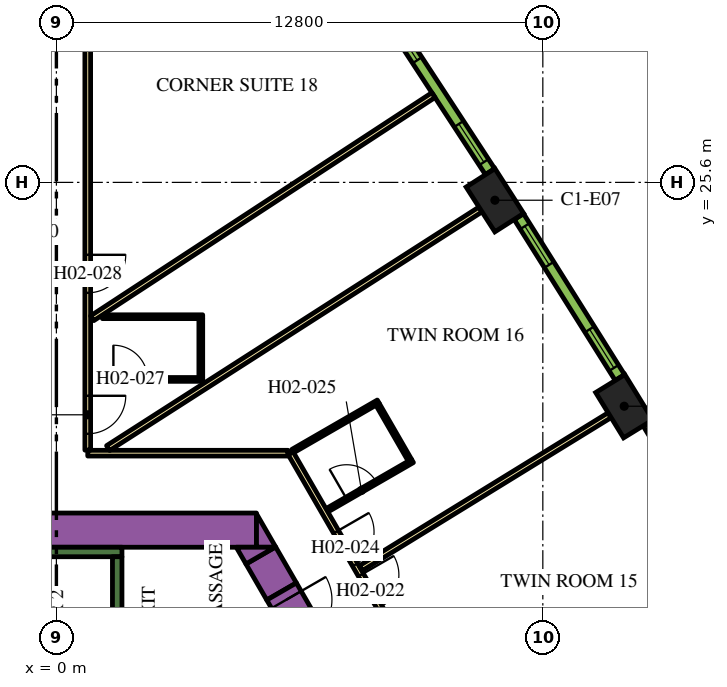
"""IFC4 building model, lengths in metres.
Left out: names, types, materials, properties, quantities, classifications, styles, units other than length and angle.
Written with IfcOpenShell. Run it as: python <this file> out.ifc"""

import sys

from ifc_helpers import new_model, si_unit, direction, frame, frame_2d, origin, origin_2d, place, context, subcontext, project, spatial, polyline, rectangle, outline, extrude, element, fill, save


model = new_model("IFC4")
c1 = context("Model", 3, precision=1e-05, world=origin(), true_north=direction((0.0, 1.0)))
c2 = subcontext(c1, "Body", "Model", "MODEL_VIEW")
j1 = project(units=[si_unit("LENGTHUNIT", "METRE"), si_unit("PLANEANGLEUNIT", "RADIAN")], contexts=[c1])
p1 = place(None, origin())
s1 = spatial("IfcSite", under=j1, at=p1, CompositionType="ELEMENT")
p2 = place(p1, origin())
s2 = spatial("IfcBuilding", under=s1, at=p2, CompositionType="ELEMENT")
p3 = place(p2, frame((0.0, 0.0, 43.2)))
s3 = spatial("IfcBuildingStorey", under=s2, at=p3, CompositionType="ELEMENT", Elevation=43.2)
for number, where, z_axis, x_axis in (
    (1, (14.942, 19.71, 0.0), (0.0, 0.0, 1.0), (-0.524, 0.852, 0.0)),
    (2, (11.539, 25.131, 0.0), (0.0, 0.0, 1.0), (-0.539, 0.842, 0.0)),
):
    element("IfcColumn", number, at=place(p3, frame(where, z_axis=z_axis, x_axis=x_axis)), inside=s3, PredefinedType="COLUMN", context=c2, shape_type="SweptSolid", body=[
        extrude(rectangle(XDim=1.4, YDim=0.9, at=origin_2d()), origin(), (0.0, 0.0, 1.0), 3.9),
    ])
p4 = place(p3, frame((-4.224, 16.45, 0.0), z_axis=(0.0, 0.0, 1.0), x_axis=(1.0, 0.0, 0.0)))
e3 = element("IfcWall", 3, at=p4, inside=s3, PredefinedType="SOLIDWALL", context=c2, shape_type="SweptSolid", body=[
    extrude(rectangle(XDim=9.488, YDim=0.9, at=frame_2d((4.744, 0.0))), origin(), (0.0, 0.0, 1.0), 3.9),
])
p5 = place(p3, origin())
e4 = element("IfcWall", 4, at=p5, inside=s3, PredefinedType="SOLIDWALL", context=c2, shape_type="SweptSolid", body=[
    extrude(outline(polyline([(5.265, 16.0), (5.265, 16.88), (5.773, 16.0), (5.265, 16.0)])), origin(), (0.0, 0.0, 1.0), 3.9),
])
p6 = place(p3, frame((5.926, 14.836, 0.0), z_axis=(0.0, 0.0, 1.0), x_axis=(-0.500076735116, 0.865981096212, 0.0)))
e5 = element("IfcWall", 5, at=p6, inside=s3, PredefinedType="SOLIDWALL", context=c2, shape_type="SweptSolid", body=[
    extrude(rectangle(XDim=1.094, YDim=0.9, at=frame_2d((0.547, 0.0))), origin(), (0.0, 0.0, 1.0), 3.9),
])
e6 = element("IfcWall", 6, at=p5, inside=s3, PredefinedType="SOLIDWALL", context=c2, shape_type="SweptSolid", body=[
    extrude(outline(polyline([(4.734, 16.0), (5.75, 16.0), (4.988, 15.56), (4.734, 16.0)])), origin(), (0.0, 0.0, 1.0), 3.9),
])
p7 = place(p3, frame((-1.725, 15.875, 0.0), z_axis=(0.0, 0.0, 1.0), x_axis=(1.0, 0.0, 0.0)))
e7 = element("IfcWall", 7, at=p7, inside=s3, PredefinedType="SOLIDWALL", context=c2, shape_type="SweptSolid", body=[
    extrude(rectangle(XDim=3.45, YDim=0.25, at=frame_2d((1.725, 0.0))), origin(), (0.0, 0.0, 1.0), 3.9),
])
p8 = place(p3, frame((1.6, 8.95, 0.0), z_axis=(0.0, 0.0, 1.0), x_axis=(0.0, 1.0, 0.0)))
e8 = element("IfcWall", 8, at=p8, inside=s3, PredefinedType="SOLIDWALL", context=c2, shape_type="SweptSolid", body=[
    extrude(rectangle(XDim=6.8, YDim=0.25, at=frame_2d((3.4, 0.0))), origin(), (0.0, 0.0, 1.0), 3.9),
])
p9 = place(p3, frame((5.926, 14.836, 0.0), z_axis=(0.0, 0.0, 1.0), x_axis=(0.500062241894, -0.865989465428, 0.0)))
e9 = element("IfcWall", 9, at=p9, inside=s3, PredefinedType="SOLIDWALL", context=c2, shape_type="SweptSolid", body=[
    extrude(rectangle(XDim=1.7, YDim=0.9, at=frame_2d((0.85, 0.0))), origin(), (0.0, 0.0, 1.0), 3.9),
])
p10 = place(p9, frame((0.25, 0.0, 0.0)))
e10 = element("IfcOpeningElement", 10, at=p10, cuts=e9, PredefinedType="OPENING", context=c2, shape_type="SweptSolid", body=[
    extrude(rectangle(XDim=1.2, YDim=2.1, at=frame_2d((0.6, 1.05))), frame((0.0, 0.46, 0.0), z_axis=(0.0, -1.0, 0.0), x_axis=(1.0, 0.0, 0.0)), (0.0, 0.0, 1.0), 0.92),
])
p11 = place(p3, frame((6.163, 18.475, 0.0), z_axis=(0.0, 0.0, 1.0), x_axis=(0.500001317485, -0.866024643133, 0.0)))
e11 = element("IfcWall", 11, at=p11, inside=s3, PredefinedType="PARTITIONING", context=c2, shape_type="SweptSolid", body=[
    extrude(rectangle(XDim=25.767, YDim=0.15, at=frame_2d((12.883, 0.0))), origin(), (0.0, 0.0, 1.0), 2.75),
])
p12 = place(p11, frame((24.586, 0.0, 0.0)))
e12 = element("IfcOpeningElement", 12, at=p12, cuts=e11, PredefinedType="OPENING", context=c2, shape_type="SweptSolid", body=[
    extrude(rectangle(XDim=1.0, YDim=2.1, at=frame_2d((0.5, 1.05))), frame((0.0, 0.085, 0.0), z_axis=(0.0, -1.0, 0.0), x_axis=(1.0, 0.0, 0.0)), (0.0, 0.0, 1.0), 0.17),
])
p13 = place(p11, frame((16.196, 0.0, 0.0)))
e13 = element("IfcOpeningElement", 13, at=p13, cuts=e11, PredefinedType="OPENING", context=c2, shape_type="SweptSolid", body=[
    extrude(rectangle(XDim=1.0, YDim=2.1, at=frame_2d((0.5, 1.05))), frame((0.0, 0.085, 0.0), z_axis=(0.0, -1.0, 0.0), x_axis=(1.0, 0.0, 0.0)), (0.0, 0.0, 1.0), 0.17),
])
p14 = place(p11, frame((14.789, 0.0, 0.0)))
e14 = element("IfcOpeningElement", 14, at=p14, cuts=e11, PredefinedType="OPENING", context=c2, shape_type="SweptSolid", body=[
    extrude(rectangle(XDim=1.1, YDim=2.1, at=frame_2d((0.55, 1.05))), frame((0.0, 0.085, 0.0), z_axis=(0.0, -1.0, 0.0), x_axis=(1.0, 0.0, 0.0)), (0.0, 0.0, 1.0), 0.17),
])
p15 = place(p11, frame((3.698, 0.0, 0.0)))
e15 = element("IfcOpeningElement", 15, at=p15, cuts=e11, PredefinedType="OPENING", context=c2, shape_type="SweptSolid", body=[
    extrude(rectangle(XDim=1.0, YDim=2.1, at=frame_2d((0.5, 1.05))), frame((0.0, 0.085, 0.0), z_axis=(0.0, -1.0, 0.0), x_axis=(1.0, 0.0, 0.0)), (0.0, 0.0, 1.0), 0.17),
])
p16 = place(p11, frame((2.391, 0.0, 0.0)))
e16 = element("IfcOpeningElement", 16, at=p16, cuts=e11, PredefinedType="OPENING", context=c2, shape_type="SweptSolid", body=[
    extrude(rectangle(XDim=1.0, YDim=2.1, at=frame_2d((0.5, 1.05))), frame((0.0, 0.085, 0.0), z_axis=(0.0, -1.0, 0.0), x_axis=(1.0, 0.0, 0.0)), (0.0, 0.0, 1.0), 0.17),
])
p17 = place(p3, frame((0.825, 18.475, 0.0), z_axis=(0.0, 0.0, 1.0), x_axis=(1.0, 0.0, 0.0)))
e17 = element("IfcWall", 17, at=p17, inside=s3, PredefinedType="PARTITIONING", context=c2, shape_type="SweptSolid", body=[
    extrude(rectangle(XDim=5.268, YDim=0.15, at=frame_2d((2.634, 0.0))), origin(), (0.0, 0.0, 1.0), 2.75),
])
p18 = place(p3, frame((0.825, 34.699, 0.0), z_axis=(0.0, 0.0, 1.0), x_axis=(0.0, -1.0, 0.0)))
e18 = element("IfcWall", 18, at=p18, inside=s3, PredefinedType="PARTITIONING", context=c2, shape_type="SweptSolid", body=[
    extrude(rectangle(XDim=16.144, YDim=0.15, at=frame_2d((8.072, 0.0))), origin(), (0.0, 0.0, 1.0), 2.75),
])
p19 = place(p18, frame((14.714, 0.0, 0.0)))
e19 = element("IfcOpeningElement", 19, at=p19, cuts=e18, PredefinedType="OPENING", context=c2, shape_type="SweptSolid", body=[
    extrude(rectangle(XDim=1.0, YDim=2.1, at=frame_2d((0.5, 1.05))), frame((0.0, 0.085, 0.0), z_axis=(0.0, -1.0, 0.0), x_axis=(1.0, 0.0, 0.0)), (0.0, 0.0, 1.0), 0.17),
])
p20 = place(p18, frame((11.005, 0.0, 0.0)))
e20 = element("IfcOpeningElement", 20, at=p20, cuts=e18, PredefinedType="OPENING", context=c2, shape_type="SweptSolid", body=[
    extrude(rectangle(XDim=1.0, YDim=2.1, at=frame_2d((0.5, 1.05))), frame((0.0, 0.085, 0.0), z_axis=(0.0, -1.0, 0.0), x_axis=(1.0, 0.0, 0.0)), (0.0, 0.0, 1.0), 0.17),
])
p21 = place(p3, frame((9.922, 27.896, 0.0), z_axis=(0.0, 0.0, 1.0), x_axis=(-0.836970816595, -0.547247523675, 0.0)))
e21 = element("IfcWall", 21, at=p21, inside=s3, PredefinedType="PARTITIONING", context=c2, shape_type="SweptSolid", body=[
    extrude(rectangle(XDim=10.729, YDim=0.15, at=frame_2d((5.364, 0.0))), origin(), (0.0, 0.0, 1.0), 2.75),
])
p22 = place(p3, frame((11.16, 24.888, 0.0), z_axis=(0.0, 0.0, 1.0), x_axis=(-0.84199813156, -0.539480441211, 0.0)))
e22 = element("IfcWall", 22, at=p22, inside=s3, PredefinedType="PARTITIONING", context=c2, shape_type="SweptSolid", body=[
    extrude(rectangle(XDim=11.638, YDim=0.15, at=frame_2d((5.819, 0.0))), origin(), (0.0, 0.0, 1.0), 2.75),
])
p23 = place(p3, frame((14.558, 19.475, 0.0), z_axis=(0.0, 0.0, 1.0), x_axis=(-0.851829455142, -0.523819223925, 0.0)))
e23 = element("IfcWall", 23, at=p23, inside=s3, PredefinedType="PARTITIONING", context=c2, shape_type="SweptSolid", body=[
    extrude(rectangle(XDim=7.688, YDim=0.15, at=frame_2d((3.844, 0.0))), origin(), (0.0, 0.0, 1.0), 2.75),
])
p24 = place(p3, frame((7.118, 16.971, 0.0), z_axis=(0.0, 0.0, 1.0), x_axis=(0.866021400173, 0.500006934395, 0.0)))
e24 = element("IfcWall", 24, at=p24, inside=s3, PredefinedType="PARTITIONING", context=c2, shape_type="SweptSolid", body=[
    extrude(rectangle(XDim=2.6, YDim=0.1, at=frame_2d((1.3, 0.0))), origin(), (0.0, 0.0, 1.0), 2.75),
])
p25 = place(p24, frame((0.6, 0.0, 0.0)))
e25 = element("IfcOpeningElement", 25, at=p25, cuts=e24, PredefinedType="OPENING", context=c2, shape_type="SweptSolid", body=[
    extrude(rectangle(XDim=0.9, YDim=2.1, at=frame_2d((0.45, 1.05))), frame((0.0, 0.06, 0.0), z_axis=(0.0, -1.0, 0.0), x_axis=(1.0, 0.0, 0.0)), (0.0, 0.0, 1.0), 0.12),
])
p26 = place(p3, frame((9.302, 18.289, 0.0), z_axis=(0.0, 0.0, 1.0), x_axis=(-0.500062241894, 0.865989465428, 0.0)))
e26 = element("IfcWall", 26, at=p26, inside=s3, PredefinedType="PARTITIONING", context=c2, shape_type="SweptSolid", body=[
    extrude(rectangle(XDim=1.7, YDim=0.1, at=frame_2d((0.85, 0.0))), origin(), (0.0, 0.0, 1.0), 2.75),
])
p27 = place(p3, frame((6.218, 18.53, 0.0), z_axis=(0.0, 0.0, 1.0), x_axis=(0.865997922154, 0.500047596559, 0.0)))
e27 = element("IfcWall", 27, at=p27, inside=s3, PredefinedType="PARTITIONING", context=c2, shape_type="SweptSolid", body=[
    extrude(rectangle(XDim=2.6, YDim=0.1, at=frame_2d((1.3, 0.0))), origin(), (0.0, 0.0, 1.0), 2.75),
])
p28 = place(p3, frame((0.9, 20.416, 0.0), z_axis=(0.0, 0.0, 1.0), x_axis=(1.0, 0.0, 0.0)))
e28 = element("IfcWall", 28, at=p28, inside=s3, PredefinedType="PARTITIONING", context=c2, shape_type="SweptSolid", body=[
    extrude(rectangle(XDim=2.95, YDim=0.1, at=frame_2d((1.475, 0.0))), origin(), (0.0, 0.0, 1.0), 2.75),
])
p29 = place(p28, frame((0.6, 0.0, 0.0)))
e29 = element("IfcOpeningElement", 29, at=p29, cuts=e28, PredefinedType="OPENING", context=c2, shape_type="SweptSolid", body=[
    extrude(rectangle(XDim=0.9, YDim=2.1, at=frame_2d((0.45, 1.05))), frame((0.0, 0.06, 0.0), z_axis=(0.0, -1.0, 0.0), x_axis=(1.0, 0.0, 0.0)), (0.0, 0.0, 1.0), 0.12),
])
p30 = place(p3, frame((3.8, 20.466, 0.0), z_axis=(0.0, 0.0, 1.0), x_axis=(0.0, 1.0, 0.0)))
e30 = element("IfcWall", 30, at=p30, inside=s3, PredefinedType="PARTITIONING", context=c2, shape_type="SweptSolid", body=[
    extrude(rectangle(XDim=1.55, YDim=0.1, at=frame_2d((0.775, 0.0))), origin(), (0.0, 0.0, 1.0), 2.75),
])
p31 = place(p3, frame((1.21, 22.066, 0.0), z_axis=(0.0, 0.0, 1.0), x_axis=(1.0, 0.0, 0.0)))
e31 = element("IfcWall", 31, at=p31, inside=s3, PredefinedType="PARTITIONING", context=c2, shape_type="SweptSolid", body=[
    extrude(rectangle(XDim=2.64, YDim=0.1, at=frame_2d((1.32, 0.0))), origin(), (0.0, 0.0, 1.0), 2.75),
])
p32 = place(p3, frame((18.143, 14.986, 0.0), z_axis=(0.0, 0.0, 1.0), x_axis=(-0.515938796285, 0.856625448191, 0.0)))
e32 = element("IfcWall", 32, at=p32, inside=s3, PredefinedType="SOLIDWALL", context=c2, shape_type="SweptSolid", body=[
    extrude(rectangle(XDim=4.998, YDim=0.29, at=frame_2d((2.499, 0.0))), origin(), (0.0, 0.0, 1.0), 3.65),
])
p33 = place(p32, frame((0.297, 0.0, 0.9)))
e33 = element("IfcOpeningElement", 33, at=p33, cuts=e32, PredefinedType="OPENING", context=c2, shape_type="SweptSolid", body=[
    extrude(rectangle(XDim=1.2, YDim=2.15, at=frame_2d((0.6, 1.075))), frame((0.0, 0.155, 0.0), z_axis=(0.0, -1.0, 0.0), x_axis=(1.0, 0.0, 0.0)), (0.0, 0.0, 1.0), 0.31),
])
p34 = place(p32, frame((3.501, 0.0, 0.9)))
e34 = element("IfcOpeningElement", 34, at=p34, cuts=e32, PredefinedType="OPENING", context=c2, shape_type="SweptSolid", body=[
    extrude(rectangle(XDim=1.2, YDim=2.15, at=frame_2d((0.6, 1.075))), frame((0.0, 0.155, 0.0), z_axis=(0.0, -1.0, 0.0), x_axis=(1.0, 0.0, 0.0)), (0.0, 0.0, 1.0), 0.31),
])
p35 = place(p3, frame((14.827, 20.466, 0.0), z_axis=(0.0, 0.0, 1.0), x_axis=(-0.531688286542, 0.846940119462, 0.0)))
e35 = element("IfcWall", 35, at=p35, inside=s3, PredefinedType="SOLIDWALL", context=c2, shape_type="SweptSolid", body=[
    extrude(rectangle(XDim=4.998, YDim=0.29, at=frame_2d((2.499, 0.0))), origin(), (0.0, 0.0, 1.0), 3.65),
])
p36 = place(p35, frame((0.297, 0.0, 0.9)))
e36 = element("IfcOpeningElement", 36, at=p36, cuts=e35, PredefinedType="OPENING", context=c2, shape_type="SweptSolid", body=[
    extrude(rectangle(XDim=1.2, YDim=2.15, at=frame_2d((0.6, 1.075))), frame((0.0, 0.155, 0.0), z_axis=(0.0, -1.0, 0.0), x_axis=(1.0, 0.0, 0.0)), (0.0, 0.0, 1.0), 0.31),
])
p37 = place(p35, frame((3.501, 0.0, 0.9)))
e37 = element("IfcOpeningElement", 37, at=p37, cuts=e35, PredefinedType="OPENING", context=c2, shape_type="SweptSolid", body=[
    extrude(rectangle(XDim=1.2, YDim=2.15, at=frame_2d((0.6, 1.075))), frame((0.0, 0.155, 0.0), z_axis=(0.0, -1.0, 0.0), x_axis=(1.0, 0.0, 0.0)), (0.0, 0.0, 1.0), 0.31),
])
p38 = place(p3, frame((11.411, 25.884, 0.0), z_axis=(0.0, 0.0, 1.0), x_axis=(-0.547204617628, 0.836998868845, 0.0)))
e38 = element("IfcWall", 38, at=p38, inside=s3, PredefinedType="SOLIDWALL", context=c2, shape_type="SweptSolid", body=[
    extrude(rectangle(XDim=4.998, YDim=0.29, at=frame_2d((2.499, 0.0))), origin(), (0.0, 0.0, 1.0), 3.65),
])
p39 = place(p38, frame((0.297, 0.0, 0.9)))
e39 = element("IfcOpeningElement", 39, at=p39, cuts=e38, PredefinedType="OPENING", context=c2, shape_type="SweptSolid", body=[
    extrude(rectangle(XDim=1.2, YDim=2.15, at=frame_2d((0.6, 1.075))), frame((0.0, 0.155, 0.0), z_axis=(0.0, -1.0, 0.0), x_axis=(1.0, 0.0, 0.0)), (0.0, 0.0, 1.0), 0.31),
])
p40 = place(p38, frame((3.501, 0.0, 0.9)))
e40 = element("IfcOpeningElement", 40, at=p40, cuts=e38, PredefinedType="OPENING", context=c2, shape_type="SweptSolid", body=[
    extrude(rectangle(XDim=1.2, YDim=2.15, at=frame_2d((0.6, 1.075))), frame((0.0, 0.155, 0.0), z_axis=(0.0, -1.0, 0.0), x_axis=(1.0, 0.0, 0.0)), (0.0, 0.0, 1.0), 0.31),
])
p41 = place(p10, origin())
e41 = element("IfcDoor", 41, at=p41, inside=s3, OperationType="SINGLE_SWING_LEFT", PredefinedType="DOOR", context=c2, shape_type="SweptSolid", body=[
    extrude(rectangle(XDim=1.2, YDim=2.1, at=frame_2d((0.6, 1.05))), frame((0.0, 0.025, 0.0), z_axis=(0.0, -1.0, 0.0), x_axis=(1.0, 0.0, 0.0)), (0.0, 0.0, 1.0), 0.05),
])
fill(e10, e41)
p42 = place(p15, origin())
e42 = element("IfcDoor", 42, at=p42, inside=s3, OperationType="SINGLE_SWING_LEFT", PredefinedType="DOOR", context=c2, shape_type="SweptSolid", body=[
    extrude(rectangle(XDim=1.0, YDim=2.1, at=frame_2d((0.5, 1.05))), frame((0.0, 0.025, 0.0), z_axis=(0.0, -1.0, 0.0), x_axis=(1.0, 0.0, 0.0)), (0.0, 0.0, 1.0), 0.05),
])
fill(e15, e42)
p43 = place(p16, origin())
e43 = element("IfcDoor", 43, at=p43, inside=s3, OperationType="SINGLE_SWING_RIGHT", PredefinedType="DOOR", context=c2, shape_type="SweptSolid", body=[
    extrude(rectangle(XDim=1.0, YDim=2.1, at=frame_2d((0.5, 1.05))), frame((0.0, 0.025, 0.0), z_axis=(0.0, -1.0, 0.0), x_axis=(1.0, 0.0, 0.0)), (0.0, 0.0, 1.0), 0.05),
])
fill(e16, e43)
p44 = place(p25, origin())
e44 = element("IfcDoor", 44, at=p44, inside=s3, OperationType="SINGLE_SWING_LEFT", PredefinedType="DOOR", context=c2, shape_type="SweptSolid", body=[
    extrude(rectangle(XDim=0.9, YDim=2.1, at=frame_2d((0.45, 1.05))), frame((0.0, 0.025, 0.0), z_axis=(0.0, -1.0, 0.0), x_axis=(1.0, 0.0, 0.0)), (0.0, 0.0, 1.0), 0.05),
])
fill(e25, e44)
p45 = place(p19, origin())
e45 = element("IfcDoor", 45, at=p45, inside=s3, OperationType="SINGLE_SWING_RIGHT", PredefinedType="DOOR", context=c2, shape_type="SweptSolid", body=[
    extrude(rectangle(XDim=1.0, YDim=2.1, at=frame_2d((0.5, 1.05))), frame((0.0, 0.025, 0.0), z_axis=(0.0, -1.0, 0.0), x_axis=(1.0, 0.0, 0.0)), (0.0, 0.0, 1.0), 0.05),
])
fill(e19, e45)
p46 = place(p29, origin())
e46 = element("IfcDoor", 46, at=p46, inside=s3, OperationType="SINGLE_SWING_LEFT", PredefinedType="DOOR", context=c2, shape_type="SweptSolid", body=[
    extrude(rectangle(XDim=0.9, YDim=2.1, at=frame_2d((0.45, 1.05))), frame((0.0, 0.025, 0.0), z_axis=(0.0, -1.0, 0.0), x_axis=(1.0, 0.0, 0.0)), (0.0, 0.0, 1.0), 0.05),
])
fill(e29, e46)
p47 = place(p20, origin())
e47 = element("IfcDoor", 47, at=p47, inside=s3, OperationType="SINGLE_SWING_RIGHT", PredefinedType="DOOR", context=c2, shape_type="SweptSolid", body=[
    extrude(rectangle(XDim=1.0, YDim=2.1, at=frame_2d((0.5, 1.05))), frame((0.0, 0.025, 0.0), z_axis=(0.0, -1.0, 0.0), x_axis=(1.0, 0.0, 0.0)), (0.0, 0.0, 1.0), 0.05),
])
fill(e20, e47)
p48 = place(p36, origin())
e48 = element("IfcWindow", 48, at=p48, inside=s3, PartitioningType="DOUBLE_PANEL_VERTICAL", PredefinedType="WINDOW", context=c2, shape_type="SweptSolid", body=[
    extrude(rectangle(XDim=1.2, YDim=2.15, at=frame_2d((0.6, 1.075))), frame((0.0, 0.015, 0.0), z_axis=(0.0, -1.0, 0.0), x_axis=(1.0, 0.0, 0.0)), (0.0, 0.0, 1.0), 0.06),
])
fill(e36, e48)
p49 = place(p37, origin())
e49 = element("IfcWindow", 49, at=p49, inside=s3, PartitioningType="DOUBLE_PANEL_VERTICAL", PredefinedType="WINDOW", context=c2, shape_type="SweptSolid", body=[
    extrude(rectangle(XDim=1.2, YDim=2.15, at=frame_2d((0.6, 1.075))), frame((0.0, 0.015, 0.0), z_axis=(0.0, -1.0, 0.0), x_axis=(1.0, 0.0, 0.0)), (0.0, 0.0, 1.0), 0.06),
])
fill(e37, e49)
p50 = place(p39, origin())
e50 = element("IfcWindow", 50, at=p50, inside=s3, PartitioningType="DOUBLE_PANEL_VERTICAL", PredefinedType="WINDOW", context=c2, shape_type="SweptSolid", body=[
    extrude(rectangle(XDim=1.2, YDim=2.15, at=frame_2d((0.6, 1.075))), frame((0.0, 0.015, 0.0), z_axis=(0.0, -1.0, 0.0), x_axis=(1.0, 0.0, 0.0)), (0.0, 0.0, 1.0), 0.06),
])
fill(e39, e50)
p51 = place(p40, origin())
e51 = element("IfcWindow", 51, at=p51, inside=s3, PartitioningType="DOUBLE_PANEL_VERTICAL", PredefinedType="WINDOW", context=c2, shape_type="SweptSolid", body=[
    extrude(rectangle(XDim=1.2, YDim=2.15, at=frame_2d((0.6, 1.075))), frame((0.0, 0.015, 0.0), z_axis=(0.0, -1.0, 0.0), x_axis=(1.0, 0.0, 0.0)), (0.0, 0.0, 1.0), 0.06),
])
fill(e40, e51)
save(model, sys.argv[1])
